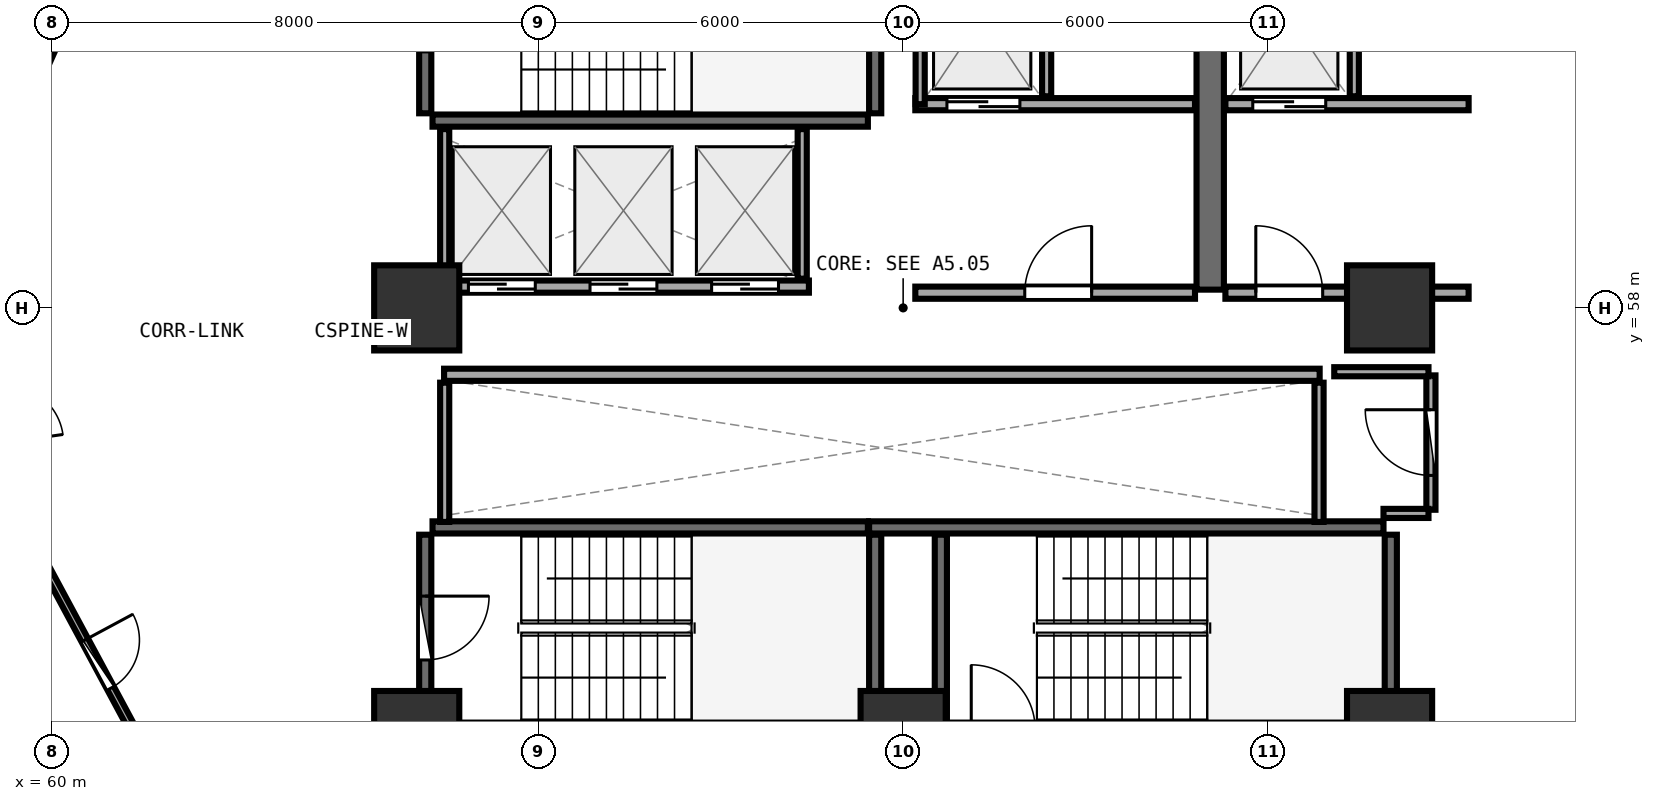
"""IFC4 building model, lengths in metres.
Left out: names, types, materials, properties, quantities, classifications, styles, units other than length and angle.
Written with IfcOpenShell. Run it as: python <this file> out.ifc"""

import sys

from ifc_helpers import new_model, si_unit, direction, frame, frame_2d, origin, origin_2d, place, context, subcontext, project, spatial, rectangle, extrude, element, fill, save


model = new_model("IFC4")
c1 = context("Model", 3, precision=1e-05, world=origin(), true_north=direction((0.0, 1.0)))
c2 = subcontext(c1, "Body", "Model", "MODEL_VIEW")
j1 = project(units=[si_unit("LENGTHUNIT", "METRE"), si_unit("PLANEANGLEUNIT", "RADIAN")], contexts=[c1])
p1 = place(None, origin())
s1 = spatial("IfcSite", under=j1, at=p1, CompositionType="ELEMENT")
p2 = place(p1, origin())
s2 = spatial("IfcBuilding", under=s1, at=p2, CompositionType="ELEMENT")
p3 = place(p2, frame((0.0, 0.0, 87.6)))
s3 = spatial("IfcBuildingStorey", under=s2, at=p3, CompositionType="ELEMENT", Elevation=87.6)
for number, where, z_axis, x_axis in (
    (1, (66.0, 51.0, 0.0), (0.0, 0.0, 1.0), (1.0, 0.0, 0.0)),
    (2, (74.0, 51.0, 0.0), (0.0, 0.0, 1.0), (1.0, 0.0, 0.0)),
    (3, (82.0, 51.0, 0.0), (0.0, 0.0, 1.0), (1.0, 0.0, 0.0)),
    (4, (82.0, 58.0, 0.0), (0.0, 0.0, 1.0), (1.0, 0.0, 0.0)),
    (5, (66.0, 58.0, 0.0), (0.0, 0.0, 1.0), (1.0, 0.0, 0.0)),
):
    element("IfcColumn", number, at=place(p3, frame(where, z_axis=z_axis, x_axis=x_axis)), inside=s3, PredefinedType="PILASTER", context=c2, shape_type="SweptSolid", body=[
        extrude(rectangle(XDim=1.4, YDim=1.4, at=origin_2d()), origin(), (0.0, 0.0, 1.0), 3.75),
    ])
p4 = place(p3, frame((66.26, 61.08, 0.0), z_axis=(0.0, 0.0, 1.0), x_axis=(1.0, 0.0, 0.0)))
e6 = element("IfcWall", 6, at=p4, inside=s3, PredefinedType="SHEAR", context=c2, shape_type="SweptSolid", body=[
    extrude(rectangle(XDim=7.16, YDim=0.2, at=frame_2d((3.58, 0.0))), origin(), (0.0, 0.0, 1.0), 3.49),
])
p5 = place(p3, frame((73.54, 61.2, 0.0), z_axis=(0.0, 0.0, 1.0), x_axis=(0.0, 1.0, 0.0)))
e7 = element("IfcWall", 7, at=p5, inside=s3, PredefinedType="SHEAR", context=c2, shape_type="SweptSolid", body=[
    extrude(rectangle(XDim=3.07, YDim=0.2, at=frame_2d((1.535, 0.0))), origin(), (0.0, 0.0, 1.0), 3.49),
])
p6 = place(p3, frame((66.14, 64.27, 0.0), z_axis=(0.0, 0.0, 1.0), x_axis=(0.0, -1.0, 0.0)))
e8 = element("IfcWall", 8, at=p6, inside=s3, PredefinedType="SHEAR", context=c2, shape_type="SweptSolid", body=[
    extrude(rectangle(XDim=3.07, YDim=0.2, at=frame_2d((1.535, 0.0))), origin(), (0.0, 0.0, 1.0), 3.49),
])
p7 = place(p6, frame((1.01, 0.0, 0.0)))
e9 = element("IfcOpeningElement", 9, at=p7, cuts=e8, PredefinedType="OPENING", context=c2, shape_type="SweptSolid", body=[
    extrude(rectangle(XDim=1.05, YDim=2.1, at=frame_2d((0.525, 1.05))), frame((0.0, 0.11, 0.0), z_axis=(0.0, -1.0, 0.0), x_axis=(1.0, 0.0, 0.0)), (0.0, 0.0, 1.0), 0.22),
])
p8 = place(p3, frame((82.02, 51.2, 0.0), z_axis=(0.0, 0.0, 1.0), x_axis=(0.0, 1.0, 0.0)))
e10 = element("IfcWall", 10, at=p8, inside=s3, PredefinedType="SHEAR", context=c2, shape_type="SweptSolid", body=[
    extrude(rectangle(XDim=3.07, YDim=0.2, at=frame_2d((1.535, 0.0))), origin(), (0.0, 0.0, 1.0), 3.49),
])
p9 = place(p3, frame((81.9, 54.39, 0.0), z_axis=(0.0, 0.0, 1.0), x_axis=(-1.0, 0.0, 0.0)))
e11 = element("IfcWall", 11, at=p9, inside=s3, PredefinedType="SHEAR", context=c2, shape_type="SweptSolid", body=[
    extrude(rectangle(XDim=8.46, YDim=0.2, at=frame_2d((4.23, 0.0))), origin(), (0.0, 0.0, 1.0), 3.49),
])
for number, where, z_axis, x_axis in (
    (12, (74.62, 54.27, 0.0), (0.0, 0.0, 1.0), (0.0, -1.0, 0.0)),
    (13, (73.54, 51.2, 0.0), (0.0, 0.0, 1.0), (0.0, 1.0, 0.0)),
):
    element("IfcWall", number, at=place(p3, frame(where, z_axis=z_axis, x_axis=x_axis)), inside=s3, PredefinedType="SHEAR", context=c2, shape_type="SweptSolid", body=[
        extrude(rectangle(XDim=3.07, YDim=0.2, at=frame_2d((1.535, 0.0))), origin(), (0.0, 0.0, 1.0), 3.49),
    ])
p10 = place(p3, frame((73.42, 54.39, 0.0), z_axis=(0.0, 0.0, 1.0), x_axis=(-1.0, 0.0, 0.0)))
e14 = element("IfcWall", 14, at=p10, inside=s3, PredefinedType="SHEAR", context=c2, shape_type="SweptSolid", body=[
    extrude(rectangle(XDim=7.16, YDim=0.2, at=frame_2d((3.58, 0.0))), origin(), (0.0, 0.0, 1.0), 3.49),
])
p11 = place(p3, frame((66.14, 54.27, 0.0), z_axis=(0.0, 0.0, 1.0), x_axis=(0.0, -1.0, 0.0)))
e15 = element("IfcWall", 15, at=p11, inside=s3, PredefinedType="SHEAR", context=c2, shape_type="SweptSolid", body=[
    extrude(rectangle(XDim=3.07, YDim=0.2, at=frame_2d((1.535, 0.0))), origin(), (0.0, 0.0, 1.0), 3.49),
])
p12 = place(p11, frame((1.01, 0.0, 0.0)))
e16 = element("IfcOpeningElement", 16, at=p12, cuts=e15, PredefinedType="OPENING", context=c2, shape_type="SweptSolid", body=[
    extrude(rectangle(XDim=1.05, YDim=2.1, at=frame_2d((0.525, 1.05))), frame((0.0, 0.11, 0.0), z_axis=(0.0, -1.0, 0.0), x_axis=(1.0, 0.0, 0.0)), (0.0, 0.0, 1.0), 0.22),
])
p13 = place(p3, frame((79.05, 58.3, 0.0), z_axis=(0.0, 0.0, 1.0), x_axis=(0.0, 1.0, 0.0)))
e17 = element("IfcWall", 17, at=p13, inside=s3, PredefinedType="SHEAR", context=c2, shape_type="SweptSolid", body=[
    extrude(rectangle(XDim=6.3, YDim=0.45, at=frame_2d((3.15, 0.0))), origin(), (0.0, 0.0, 1.0), 3.49),
])
p14 = place(p3, frame((74.2, 61.35, 0.0), z_axis=(0.0, 0.0, 1.0), x_axis=(1.0, 0.0, 0.0)))
e18 = element("IfcWall", 18, at=p14, inside=s3, PredefinedType="SOLIDWALL", context=c2, shape_type="SweptSolid", body=[
    extrude(rectangle(XDim=4.6, YDim=0.2, at=frame_2d((2.3, 0.0))), origin(), (0.0, 0.0, 1.0), 3.48),
])
p15 = place(p14, frame((0.52, 0.0, 0.0)))
e19 = element("IfcOpeningElement", 19, at=p15, cuts=e18, PredefinedType="OPENING", context=c2, shape_type="SweptSolid", body=[
    extrude(rectangle(XDim=1.2, YDim=2.15, at=frame_2d((0.6, 1.075))), frame((0.0, 0.11, 0.0), z_axis=(0.0, -1.0, 0.0), x_axis=(1.0, 0.0, 0.0)), (0.0, 0.0, 1.0), 0.22),
])
p16 = place(p3, frame((74.28, 61.35, 0.0), z_axis=(0.0, 0.0, 1.0), x_axis=(0.0, 1.0, 0.0)))
e20 = element("IfcWall", 20, at=p16, inside=s3, PredefinedType="PARTITIONING", context=c2, shape_type="SweptSolid", body=[
    extrude(rectangle(XDim=2.97, YDim=0.15, at=frame_2d((1.485, 0.0))), origin(), (0.0, 0.0, 1.0), 3.48),
])
p17 = place(p3, frame((76.36, 61.48, 0.0), z_axis=(0.0, 0.0, 1.0), x_axis=(0.0, 1.0, 0.0)))
e21 = element("IfcWall", 21, at=p17, inside=s3, PredefinedType="PARTITIONING", context=c2, shape_type="SweptSolid", body=[
    extrude(rectangle(XDim=2.84, YDim=0.15, at=frame_2d((1.42, 0.0))), origin(), (0.0, 0.0, 1.0), 3.48),
])
p18 = place(p3, frame((79.3, 61.35, 0.0), z_axis=(0.0, 0.0, 1.0), x_axis=(1.0, 0.0, 0.0)))
e22 = element("IfcWall", 22, at=p18, inside=s3, PredefinedType="SOLIDWALL", context=c2, shape_type="SweptSolid", body=[
    extrude(rectangle(XDim=4.0, YDim=0.2, at=frame_2d((2.0, 0.0))), origin(), (0.0, 0.0, 1.0), 2.775),
])
p19 = place(p18, frame((0.45, 0.0, 0.0)))
e23 = element("IfcOpeningElement", 23, at=p19, cuts=e22, PredefinedType="OPENING", context=c2, shape_type="SweptSolid", body=[
    extrude(rectangle(XDim=1.2, YDim=2.15, at=frame_2d((0.6, 1.075))), frame((0.0, 0.11, 0.0), z_axis=(0.0, -1.0, 0.0), x_axis=(1.0, 0.0, 0.0)), (0.0, 0.0, 1.0), 0.22),
])
p20 = place(p3, frame((81.42, 61.48, 0.0), z_axis=(0.0, 0.0, 1.0), x_axis=(0.0, 1.0, 0.0)))
e24 = element("IfcWall", 24, at=p20, inside=s3, PredefinedType="PARTITIONING", context=c2, shape_type="SweptSolid", body=[
    extrude(rectangle(XDim=2.84, YDim=0.15, at=frame_2d((1.42, 0.0))), origin(), (0.0, 0.0, 1.0), 3.48),
])
p21 = place(p3, frame((74.2, 58.25, 0.0), z_axis=(0.0, 0.0, 1.0), x_axis=(1.0, 0.0, 0.0)))
e25 = element("IfcWall", 25, at=p21, inside=s3, PredefinedType="SOLIDWALL", context=c2, shape_type="SweptSolid", body=[
    extrude(rectangle(XDim=4.6, YDim=0.2, at=frame_2d((2.3, 0.0))), origin(), (0.0, 0.0, 1.0), 3.48),
])
p22 = place(p21, frame((1.8, 0.0, 0.0)))
e26 = element("IfcOpeningElement", 26, at=p22, cuts=e25, PredefinedType="OPENING", context=c2, shape_type="SweptSolid", body=[
    extrude(rectangle(XDim=1.1, YDim=2.1, at=frame_2d((0.55, 1.05))), frame((0.0, 0.11, 0.0), z_axis=(0.0, -1.0, 0.0), x_axis=(1.0, 0.0, 0.0)), (0.0, 0.0, 1.0), 0.22),
])
p23 = place(p3, frame((79.3, 58.25, 0.0), z_axis=(0.0, 0.0, 1.0), x_axis=(1.0, 0.0, 0.0)))
e27 = element("IfcWall", 27, at=p23, inside=s3, PredefinedType="SOLIDWALL", context=c2, shape_type="SweptSolid", body=[
    extrude(rectangle(XDim=4.0, YDim=0.2, at=frame_2d((2.0, 0.0))), origin(), (0.0, 0.0, 1.0), 2.775),
])
p24 = place(p23, frame((0.5, 0.0, 0.0)))
e28 = element("IfcOpeningElement", 28, at=p24, cuts=e27, PredefinedType="OPENING", context=c2, shape_type="SweptSolid", body=[
    extrude(rectangle(XDim=1.1, YDim=2.1, at=frame_2d((0.55, 1.05))), frame((0.0, 0.11, 0.0), z_axis=(0.0, -1.0, 0.0), x_axis=(1.0, 0.0, 0.0)), (0.0, 0.0, 1.0), 0.22),
])
p25 = place(p3, frame((66.45, 58.35, 0.0), z_axis=(0.0, 0.0, 1.0), x_axis=(1.0, 0.0, 0.0)))
e29 = element("IfcWall", 29, at=p25, inside=s3, PredefinedType="SOLIDWALL", context=c2, shape_type="SweptSolid", body=[
    extrude(rectangle(XDim=6.0, YDim=0.2, at=frame_2d((3.0, 0.0))), origin(), (0.0, 0.0, 1.0), 3.48),
])
p26 = place(p25, frame((0.4, 0.0, 0.0)))
e30 = element("IfcOpeningElement", 30, at=p26, cuts=e29, PredefinedType="OPENING", context=c2, shape_type="SweptSolid", body=[
    extrude(rectangle(XDim=1.1, YDim=2.1, at=frame_2d((0.55, 1.05))), frame((0.0, 0.11, 0.0), z_axis=(0.0, -1.0, 0.0), x_axis=(1.0, 0.0, 0.0)), (0.0, 0.0, 1.0), 0.22),
])
p27 = place(p25, frame((2.4, 0.0, 0.0)))
e31 = element("IfcOpeningElement", 31, at=p27, cuts=e29, PredefinedType="OPENING", context=c2, shape_type="SweptSolid", body=[
    extrude(rectangle(XDim=1.1, YDim=2.1, at=frame_2d((0.55, 1.05))), frame((0.0, 0.11, 0.0), z_axis=(0.0, -1.0, 0.0), x_axis=(1.0, 0.0, 0.0)), (0.0, 0.0, 1.0), 0.22),
])
p28 = place(p25, frame((4.4, 0.0, 0.0)))
e32 = element("IfcOpeningElement", 32, at=p28, cuts=e29, PredefinedType="OPENING", context=c2, shape_type="SweptSolid", body=[
    extrude(rectangle(XDim=1.1, YDim=2.1, at=frame_2d((0.55, 1.05))), frame((0.0, 0.11, 0.0), z_axis=(0.0, -1.0, 0.0), x_axis=(1.0, 0.0, 0.0)), (0.0, 0.0, 1.0), 0.22),
])
for number, where, z_axis, x_axis in (
    (33, (66.46, 58.48, 0.0), (0.0, 0.0, 1.0), (0.0, 1.0, 0.0)),
    (34, (72.34, 58.48, 0.0), (0.0, 0.0, 1.0), (0.0, 1.0, 0.0)),
):
    element("IfcWall", number, at=place(p3, frame(where, z_axis=z_axis, x_axis=x_axis)), inside=s3, PredefinedType="PARTITIONING", context=c2, shape_type="SweptSolid", body=[
        extrude(rectangle(XDim=2.46, YDim=0.15, at=frame_2d((1.23, 0.0))), origin(), (0.0, 0.0, 1.0), 3.48),
    ])
p29 = place(p3, frame((66.45, 56.9, 0.0), z_axis=(0.0, 0.0, 1.0), x_axis=(1.0, 0.0, 0.0)))
e35 = element("IfcWall", 35, at=p29, inside=s3, PredefinedType="SOLIDWALL", context=c2, shape_type="SweptSolid", body=[
    extrude(rectangle(XDim=14.4, YDim=0.2, at=frame_2d((7.2, 0.0))), origin(), (0.0, 0.0, 1.0), 3.48),
])
for number, where, z_axis, x_axis in (
    (36, (66.46, 54.48, 0.0), (0.0, 0.0, 1.0), (0.0, 1.0, 0.0)),
    (37, (80.84, 54.48, 0.0), (0.0, 0.0, 1.0), (0.0, 1.0, 0.0)),
):
    element("IfcWall", number, at=place(p3, frame(where, z_axis=z_axis, x_axis=x_axis)), inside=s3, PredefinedType="PARTITIONING", context=c2, shape_type="SweptSolid", body=[
        extrude(rectangle(XDim=2.29, YDim=0.15, at=frame_2d((1.145, 0.0))), origin(), (0.0, 0.0, 1.0), 3.48),
    ])
p30 = place(p3, frame((82.68, 54.68, 0.0), z_axis=(0.0, 0.0, 1.0), x_axis=(0.0, 1.0, 0.0)))
e38 = element("IfcWall", 38, at=p30, inside=s3, PredefinedType="PARTITIONING", context=c2, shape_type="SweptSolid", body=[
    extrude(rectangle(XDim=2.21, YDim=0.15, at=frame_2d((1.105, 0.0))), origin(), (0.0, 0.0, 1.0), 3.48),
])
p31 = place(p30, frame((0.565, 0.0, 0.0)))
e39 = element("IfcOpeningElement", 39, at=p31, cuts=e38, PredefinedType="OPENING", context=c2, shape_type="SweptSolid", body=[
    extrude(rectangle(XDim=1.08, YDim=2.1, at=frame_2d((0.54, 1.05))), frame((0.0, 0.085, 0.0), z_axis=(0.0, -1.0, 0.0), x_axis=(1.0, 0.0, 0.0)), (0.0, 0.0, 1.0), 0.17),
])
p32 = place(p3, frame((61.414, 65.428, 0.0), z_axis=(0.0, 0.0, 1.0), x_axis=(-0.407078232177, -0.913393295841, 0.0)))
e40 = element("IfcWall", 40, at=p32, inside=s3, PredefinedType="PARTITIONING", context=c2, shape_type="SweptSolid", body=[
    extrude(rectangle(XDim=5.302, YDim=0.12, at=frame_2d((2.651, 0.0))), origin(), (0.0, 0.0, 1.0), 2.925),
])
p33 = place(p32, frame((2.201, 0.0, 0.0)))
e41 = element("IfcOpeningElement", 41, at=p33, cuts=e40, PredefinedType="OPENING", context=c2, shape_type="SweptSolid", body=[
    extrude(rectangle(XDim=0.9, YDim=2.08, at=frame_2d((0.45, 1.04))), frame((0.0, 0.07, 0.0), z_axis=(0.0, -1.0, 0.0), x_axis=(1.0, 0.0, 0.0)), (0.0, 0.0, 1.0), 0.14),
])
p34 = place(p3, frame((59.49, 54.488, 0.0), z_axis=(0.0, 0.0, 1.0), x_axis=(0.473630069111, -0.880723882743, 0.0)))
e42 = element("IfcWall", 42, at=p34, inside=s3, PredefinedType="PARTITIONING", context=c2, shape_type="SweptSolid", body=[
    extrude(rectangle(XDim=5.332, YDim=0.12, at=frame_2d((2.666, 0.0))), origin(), (0.0, 0.0, 1.0), 2.925),
])
p35 = place(p34, frame((2.216, 0.0, 0.0)))
e43 = element("IfcOpeningElement", 43, at=p35, cuts=e42, PredefinedType="OPENING", context=c2, shape_type="SweptSolid", body=[
    extrude(rectangle(XDim=0.9, YDim=2.08, at=frame_2d((0.45, 1.04))), frame((0.0, 0.07, 0.0), z_axis=(0.0, -1.0, 0.0), x_axis=(1.0, 0.0, 0.0)), (0.0, 0.0, 1.0), 0.14),
])
p36 = place(p3, frame((84.608, 48.36, 0.0), z_axis=(0.0, 0.0, 1.0), x_axis=(0.596833425992, 0.802365167251, 0.0)))
e44 = element("IfcWall", 44, at=p36, inside=s3, PredefinedType="PARTITIONING", context=c2, shape_type="SweptSolid", body=[
    extrude(rectangle(XDim=5.399, YDim=0.12, at=frame_2d((2.699, 0.0))), origin(), (0.0, 0.0, 1.0), 2.925),
])
p37 = place(p36, frame((2.249, 0.0, 0.0)))
e45 = element("IfcOpeningElement", 45, at=p37, cuts=e44, PredefinedType="OPENING", context=c2, shape_type="SweptSolid", body=[
    extrude(rectangle(XDim=0.9, YDim=2.08, at=frame_2d((0.45, 1.04))), frame((0.0, 0.07, 0.0), z_axis=(0.0, -1.0, 0.0), x_axis=(1.0, 0.0, 0.0)), (0.0, 0.0, 1.0), 0.14),
])
p38 = place(p3, frame((81.9, 54.62, 0.0), z_axis=(0.0, 0.0, 1.0), x_axis=(1.0, 0.0, 0.0)))
e46 = element("IfcWall", 46, at=p38, inside=s3, PredefinedType="PARTITIONING", context=c2, shape_type="SweptSolid", body=[
    extrude(rectangle(XDim=0.74, YDim=0.15, at=frame_2d((0.37, 0.0))), origin(), (0.0, 0.0, 1.0), 2.775),
])
p39 = place(p3, frame((82.64, 56.95, 0.0), z_axis=(0.0, 0.0, 1.0), x_axis=(-1.0, 0.0, 0.0)))
e47 = element("IfcWall", 47, at=p39, inside=s3, PredefinedType="PARTITIONING", context=c2, shape_type="SweptSolid", body=[
    extrude(rectangle(XDim=1.55, YDim=0.15, at=frame_2d((0.775, 0.0))), origin(), (0.0, 0.0, 1.0), 2.775),
])
p40 = place(p12, origin())
e48 = element("IfcDoor", 48, at=p40, inside=s3, OperationType="SINGLE_SWING_LEFT", PredefinedType="DOOR", context=c2, shape_type="SweptSolid", body=[
    extrude(rectangle(XDim=1.05, YDim=2.1, at=frame_2d((0.525, 1.05))), frame((0.0, 0.025, 0.0), z_axis=(0.0, -1.0, 0.0), x_axis=(1.0, 0.0, 0.0)), (0.0, 0.0, 1.0), 0.05),
])
fill(e16, e48)
p41 = place(p15, origin())
e49 = element("IfcDoor", 49, at=p41, inside=s3, OperationType="DOUBLE_DOOR_SLIDING", PredefinedType="DOOR", context=c2, shape_type="SweptSolid", body=[
    extrude(rectangle(XDim=1.2, YDim=2.15, at=frame_2d((0.6, 1.075))), frame((0.0, 0.025, 0.0), z_axis=(0.0, -1.0, 0.0), x_axis=(1.0, 0.0, 0.0)), (0.0, 0.0, 1.0), 0.05),
])
fill(e19, e49)
p42 = place(p19, origin())
e50 = element("IfcDoor", 50, at=p42, inside=s3, OperationType="DOUBLE_DOOR_SLIDING", PredefinedType="DOOR", context=c2, shape_type="SweptSolid", body=[
    extrude(rectangle(XDim=1.2, YDim=2.15, at=frame_2d((0.6, 1.075))), frame((0.0, 0.025, 0.0), z_axis=(0.0, -1.0, 0.0), x_axis=(1.0, 0.0, 0.0)), (0.0, 0.0, 1.0), 0.05),
])
fill(e23, e50)
p43 = place(p22, frame((1.1, 0.0, 0.0), z_axis=(0.0, 0.0, 1.0), x_axis=(-1.0, 0.0, 0.0)))
e51 = element("IfcDoor", 51, at=p43, inside=s3, OperationType="SINGLE_SWING_LEFT", PredefinedType="DOOR", context=c2, shape_type="SweptSolid", body=[
    extrude(rectangle(XDim=1.1, YDim=2.1, at=frame_2d((0.55, 1.05))), frame((0.0, 0.025, 0.0), z_axis=(0.0, -1.0, 0.0), x_axis=(1.0, 0.0, 0.0)), (0.0, 0.0, 1.0), 0.05),
])
fill(e26, e51)
p44 = place(p24, frame((1.1, 0.0, 0.0), z_axis=(0.0, 0.0, 1.0), x_axis=(-1.0, 0.0, 0.0)))
e52 = element("IfcDoor", 52, at=p44, inside=s3, OperationType="SINGLE_SWING_RIGHT", PredefinedType="DOOR", context=c2, shape_type="SweptSolid", body=[
    extrude(rectangle(XDim=1.1, YDim=2.1, at=frame_2d((0.55, 1.05))), frame((0.0, 0.025, 0.0), z_axis=(0.0, -1.0, 0.0), x_axis=(1.0, 0.0, 0.0)), (0.0, 0.0, 1.0), 0.05),
])
fill(e28, e52)
p45 = place(p26, origin())
e53 = element("IfcDoor", 53, at=p45, inside=s3, OperationType="DOUBLE_DOOR_SLIDING", PredefinedType="DOOR", context=c2, shape_type="SweptSolid", body=[
    extrude(rectangle(XDim=1.1, YDim=2.1, at=frame_2d((0.55, 1.05))), frame((0.0, 0.025, 0.0), z_axis=(0.0, -1.0, 0.0), x_axis=(1.0, 0.0, 0.0)), (0.0, 0.0, 1.0), 0.05),
])
fill(e30, e53)
p46 = place(p27, origin())
e54 = element("IfcDoor", 54, at=p46, inside=s3, OperationType="DOUBLE_DOOR_SLIDING", PredefinedType="DOOR", context=c2, shape_type="SweptSolid", body=[
    extrude(rectangle(XDim=1.1, YDim=2.1, at=frame_2d((0.55, 1.05))), frame((0.0, 0.025, 0.0), z_axis=(0.0, -1.0, 0.0), x_axis=(1.0, 0.0, 0.0)), (0.0, 0.0, 1.0), 0.05),
])
fill(e31, e54)
p47 = place(p28, origin())
e55 = element("IfcDoor", 55, at=p47, inside=s3, OperationType="DOUBLE_DOOR_SLIDING", PredefinedType="DOOR", context=c2, shape_type="SweptSolid", body=[
    extrude(rectangle(XDim=1.1, YDim=2.1, at=frame_2d((0.55, 1.05))), frame((0.0, 0.025, 0.0), z_axis=(0.0, -1.0, 0.0), x_axis=(1.0, 0.0, 0.0)), (0.0, 0.0, 1.0), 0.05),
])
fill(e32, e55)
p48 = place(p31, origin())
e56 = element("IfcDoor", 56, at=p48, inside=s3, OperationType="SINGLE_SWING_RIGHT", PredefinedType="DOOR", context=c2, shape_type="SweptSolid", body=[
    extrude(rectangle(XDim=1.08, YDim=2.1, at=frame_2d((0.54, 1.05))), frame((0.0, 0.025, 0.0), z_axis=(0.0, -1.0, 0.0), x_axis=(1.0, 0.0, 0.0)), (0.0, 0.0, 1.0), 0.05),
])
fill(e39, e56)
p49 = place(p35, origin())
e57 = element("IfcDoor", 57, at=p49, inside=s3, OperationType="SINGLE_SWING_LEFT", PredefinedType="DOOR", context=c2, shape_type="SweptSolid", body=[
    extrude(rectangle(XDim=0.9, YDim=2.08, at=frame_2d((0.45, 1.04))), frame((0.0, 0.025, 0.0), z_axis=(0.0, -1.0, 0.0), x_axis=(1.0, 0.0, 0.0)), (0.0, 0.0, 1.0), 0.05),
])
fill(e43, e57)
save(model, sys.argv[1])
